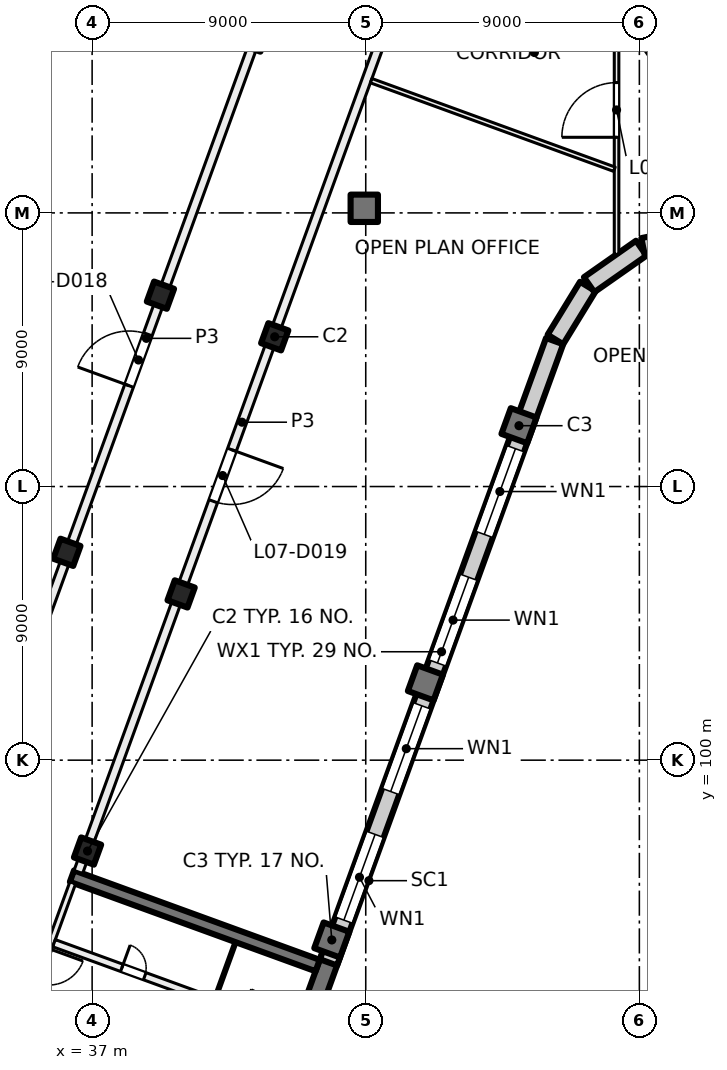
"""IFC4 building model, lengths in metres.
Left out: names, types, materials, properties, quantities, classifications, styles, units other than length and angle.
Written with IfcOpenShell. Run it as: python <this file> out.ifc"""

import sys

from ifc_helpers import new_model, si_unit, direction, frame, frame_2d, origin, origin_2d, place, context, subcontext, project, spatial, rectangle, hollow_rectangle, extrude, element, fill, save


model = new_model("IFC4")
c1 = context("Model", 3, precision=1e-05, world=origin(), true_north=direction((0.0, 1.0)))
c2 = subcontext(c1, "Body", "Model", "MODEL_VIEW")
j1 = project(units=[si_unit("LENGTHUNIT", "METRE"), si_unit("PLANEANGLEUNIT", "RADIAN")], contexts=[c1])
p1 = place(None, origin())
s1 = spatial("IfcSite", under=j1, at=p1, CompositionType="ELEMENT")
p2 = place(p1, origin())
s2 = spatial("IfcBuilding", under=s1, at=p2, CompositionType="ELEMENT")
p3 = place(p2, frame((0.0, 0.0, 35.5)))
s3 = spatial("IfcBuildingStorey", under=s2, at=p3, CompositionType="ELEMENT", Elevation=35.5)
p4 = place(p3, frame((56.036, 123.43, 0.0), z_axis=(0.0, 0.0, 1.0), x_axis=(0.573576436351, -0.819152044289, 0.0)))
e1 = element("IfcColumn", 1, at=p4, inside=s3, PredefinedType="COLUMN", context=c2, shape_type="SweptSolid", body=[
    extrude(hollow_rectangle(XDim=1.4, YDim=1.4, WallThickness=0.04, at=origin_2d()), origin(), (0.0, 0.0, 1.0), 4.0),
])
p5 = place(p3, frame((45.952, 118.152, 0.0), z_axis=(0.0, 0.0, 1.0), x_axis=(1.0, 0.0, 0.0)))
e2 = element("IfcColumn", 2, at=p5, inside=s3, PredefinedType="COLUMN", context=c2, shape_type="SweptSolid", body=[
    extrude(rectangle(XDim=0.9, YDim=0.9, at=origin_2d()), origin(), (0.0, 0.0, 1.0), 4.0),
])
for number, where, z_axis, x_axis in (
    (3, (43.006, 113.925, 0.0), (0.0, 0.0, 1.0), (-0.342, -0.94, 0.0)),
    (4, (39.927, 105.468, 0.0), (0.0, 0.0, 1.0), (-0.342, -0.94, 0.0)),
    (5, (36.849, 97.011, 0.0), (0.0, 0.0, 1.0), (-0.342, -0.94, 0.0)),
    (6, (39.247, 115.293, 0.0), (0.0, 0.0, 1.0), (-0.342, -0.94, 0.0)),
    (7, (36.169, 106.836, 0.0), (0.0, 0.0, 1.0), (-0.342, -0.94, 0.0)),
):
    element("IfcColumn", number, at=place(p3, frame(where, z_axis=z_axis, x_axis=x_axis)), inside=s3, PredefinedType="COLUMN", context=c2, shape_type="SweptSolid", body=[
        extrude(rectangle(XDim=0.7, YDim=0.7, at=origin_2d()), origin(), (0.0, 0.0, 1.0), 4.0),
    ])
for number, where, z_axis, x_axis in (
    (8, (51.04, 111.001, 0.0), (0.0, 0.0, 1.0), (-0.342, -0.94, 0.0)),
    (9, (47.962, 102.544, 0.0), (0.0, 0.0, 1.0), (-0.342, -0.94, 0.0)),
    (10, (44.884, 94.087, 0.0), (0.0, 0.0, 1.0), (-0.342, -0.94, 0.0)),
):
    element("IfcColumn", number, at=place(p3, frame(where, z_axis=z_axis, x_axis=x_axis)), inside=s3, PredefinedType="COLUMN", context=c2, shape_type="SweptSolid", body=[
        extrude(rectangle(XDim=0.9, YDim=0.9, at=origin_2d()), origin(), (0.0, 0.0, 1.0), 4.0),
    ])
p6 = place(p3, frame((41.827, 85.249, 0.0), z_axis=(0.0, 0.0, 1.0), x_axis=(0.342016162452, 0.939694069696, 0.0)))
e11 = element("IfcWall", 11, at=p6, inside=s3, PredefinedType="SHEAR", context=c2, shape_type="SweptSolid", body=[
    extrude(rectangle(XDim=8.9, YDim=0.6, at=frame_2d((4.45, 0.0))), origin(), (0.0, 0.0, 1.0), 4.0),
])
p7 = place(p3, frame((44.418, 93.245, 0.0), z_axis=(0.0, 0.0, 1.0), x_axis=(-0.93969060187, 0.342025690201, 0.0)))
e12 = element("IfcWall", 12, at=p7, inside=s3, PredefinedType="SHEAR", context=c2, shape_type="SweptSolid", body=[
    extrude(rectangle(XDim=8.6, YDim=0.4, at=frame_2d((4.3, 0.0))), origin(), (0.0, 0.0, 1.0), 4.0),
])
p8 = place(p3, frame((52.212, 113.783, 0.0), z_axis=(0.0, 0.0, 1.0), x_axis=(-0.34202521188, -0.939690775968, 0.0)))
e13 = element("IfcWall", 13, at=p8, inside=s3, PredefinedType="SOLIDWALL", context=c2, shape_type="SweptSolid", body=[
    extrude(rectangle(XDim=21.745, YDim=0.6, at=frame_2d((10.873, 0.0))), origin(), (0.0, 0.0, 1.0), 3.625),
])
p9 = place(p8, frame((3.765, 0.0, 0.9)))
e14 = element("IfcOpeningElement", 14, at=p9, cuts=e13, PredefinedType="OPENING", context=c2, shape_type="SweptSolid", body=[
    extrude(rectangle(XDim=3.0, YDim=2.4, at=frame_2d((1.5, 1.2))), frame((0.0, 0.31, 0.0), z_axis=(0.0, -1.0, 0.0), x_axis=(1.0, 0.0, 0.0)), (0.0, 0.0, 1.0), 0.62),
])
p10 = place(p8, frame((8.265, 0.0, 0.9)))
e15 = element("IfcOpeningElement", 15, at=p10, cuts=e13, PredefinedType="OPENING", context=c2, shape_type="SweptSolid", body=[
    extrude(rectangle(XDim=3.0, YDim=2.4, at=frame_2d((1.5, 1.2))), frame((0.0, 0.31, 0.0), z_axis=(0.0, -1.0, 0.0), x_axis=(1.0, 0.0, 0.0)), (0.0, 0.0, 1.0), 0.62),
])
p11 = place(p8, frame((12.765, 0.0, 0.9)))
e16 = element("IfcOpeningElement", 16, at=p11, cuts=e13, PredefinedType="OPENING", context=c2, shape_type="SweptSolid", body=[
    extrude(rectangle(XDim=3.0, YDim=2.4, at=frame_2d((1.5, 1.2))), frame((0.0, 0.31, 0.0), z_axis=(0.0, -1.0, 0.0), x_axis=(1.0, 0.0, 0.0)), (0.0, 0.0, 1.0), 0.62),
])
p12 = place(p8, frame((17.265, 0.0, 0.9)))
e17 = element("IfcOpeningElement", 17, at=p12, cuts=e13, PredefinedType="OPENING", context=c2, shape_type="SweptSolid", body=[
    extrude(rectangle(XDim=3.0, YDim=2.4, at=frame_2d((1.5, 1.2))), frame((0.0, 0.31, 0.0), z_axis=(0.0, -1.0, 0.0), x_axis=(1.0, 0.0, 0.0)), (0.0, 0.0, 1.0), 0.62),
])
p13 = place(p3, frame((53.305, 115.578, 0.0), z_axis=(0.0, 0.0, 1.0), x_axis=(-0.522402266438, -0.852699168535, 0.0)))
e18 = element("IfcWall", 18, at=p13, inside=s3, PredefinedType="SOLIDWALL", context=c2, shape_type="SweptSolid", body=[
    extrude(rectangle(XDim=2.042, YDim=0.6, at=frame_2d((1.021, 0.0))), origin(), (0.0, 0.0, 1.0), 3.625),
])
for number, where, z_axis, x_axis in (
    (19, (55.062, 116.839, 0.0), (0.0, 0.0, 1.0), (-0.819, -0.574, 0.0)),
    (20, (57.175, 117.294, 0.0), (0.0, 0.0, 1.0), (-0.98, -0.199, 0.0)),
):
    element("IfcWall", number, at=place(p3, frame(where, z_axis=z_axis, x_axis=x_axis)), inside=s3, PredefinedType="SOLIDWALL", context=c2, shape_type="SweptSolid", body=[
        extrude(rectangle(XDim=2.092, YDim=0.6, at=frame_2d((1.046, 0.0))), origin(), (0.0, 0.0, 1.0), 3.625),
    ])
p14 = place(p3, frame((24.666, 100.669, 0.0), z_axis=(0.0, 0.0, 1.0), x_axis=(0.34201964167, 0.939692803373, 0.0)))
e21 = element("IfcWall", 21, at=p14, inside=s3, PredefinedType="SOLIDWALL", context=c2, shape_type="SweptSolid", body=[
    extrude(rectangle(XDim=32.884, YDim=0.6, at=frame_2d((16.442, 0.0))), origin(), (0.0, 0.0, 1.0), 3.625),
])
p15 = place(p14, frame((1.48, 0.0, 0.9)))
e22 = element("IfcOpeningElement", 22, at=p15, cuts=e21, PredefinedType="OPENING", context=c2, shape_type="SweptSolid", body=[
    extrude(rectangle(XDim=3.0, YDim=2.4, at=frame_2d((1.5, 1.2))), frame((0.0, 0.31, 0.0), z_axis=(0.0, -1.0, 0.0), x_axis=(1.0, 0.0, 0.0)), (0.0, 0.0, 1.0), 0.62),
])
p16 = place(p14, frame((5.98, 0.0, 0.9)))
e23 = element("IfcOpeningElement", 23, at=p16, cuts=e21, PredefinedType="OPENING", context=c2, shape_type="SweptSolid", body=[
    extrude(rectangle(XDim=3.0, YDim=2.4, at=frame_2d((1.5, 1.2))), frame((0.0, 0.31, 0.0), z_axis=(0.0, -1.0, 0.0), x_axis=(1.0, 0.0, 0.0)), (0.0, 0.0, 1.0), 0.62),
])
p17 = place(p14, frame((10.48, 0.0, 0.9)))
e24 = element("IfcOpeningElement", 24, at=p17, cuts=e21, PredefinedType="OPENING", context=c2, shape_type="SweptSolid", body=[
    extrude(rectangle(XDim=3.0, YDim=2.4, at=frame_2d((1.5, 1.2))), frame((0.0, 0.31, 0.0), z_axis=(0.0, -1.0, 0.0), x_axis=(1.0, 0.0, 0.0)), (0.0, 0.0, 1.0), 0.62),
])
p18 = place(p14, frame((14.98, 0.0, 0.9)))
e25 = element("IfcOpeningElement", 25, at=p18, cuts=e21, PredefinedType="OPENING", context=c2, shape_type="SweptSolid", body=[
    extrude(rectangle(XDim=3.0, YDim=2.4, at=frame_2d((1.5, 1.2))), frame((0.0, 0.31, 0.0), z_axis=(0.0, -1.0, 0.0), x_axis=(1.0, 0.0, 0.0)), (0.0, 0.0, 1.0), 0.62),
])
p19 = place(p14, frame((19.48, 0.0, 0.9)))
e26 = element("IfcOpeningElement", 26, at=p19, cuts=e21, PredefinedType="OPENING", context=c2, shape_type="SweptSolid", body=[
    extrude(rectangle(XDim=3.0, YDim=2.4, at=frame_2d((1.5, 1.2))), frame((0.0, 0.31, 0.0), z_axis=(0.0, -1.0, 0.0), x_axis=(1.0, 0.0, 0.0)), (0.0, 0.0, 1.0), 0.62),
])
p20 = place(p14, frame((23.98, 0.0, 0.9)))
e27 = element("IfcOpeningElement", 27, at=p20, cuts=e21, PredefinedType="OPENING", context=c2, shape_type="SweptSolid", body=[
    extrude(rectangle(XDim=3.0, YDim=2.4, at=frame_2d((1.5, 1.2))), frame((0.0, 0.31, 0.0), z_axis=(0.0, -1.0, 0.0), x_axis=(1.0, 0.0, 0.0)), (0.0, 0.0, 1.0), 0.62),
])
p21 = place(p14, frame((28.48, 0.0, 0.9)))
e28 = element("IfcOpeningElement", 28, at=p21, cuts=e21, PredefinedType="OPENING", context=c2, shape_type="SweptSolid", body=[
    extrude(rectangle(XDim=3.0, YDim=2.4, at=frame_2d((1.5, 1.2))), frame((0.0, 0.31, 0.0), z_axis=(0.0, -1.0, 0.0), x_axis=(1.0, 0.0, 0.0)), (0.0, 0.0, 1.0), 0.62),
])
p22 = place(p3, frame((36.362, 95.964, 0.0), z_axis=(0.0, 0.0, 1.0), x_axis=(-0.341995824804, -0.939701471648, 0.0)))
e29 = element("IfcWall", 29, at=p22, inside=s3, PredefinedType="PARTITIONING", context=c2, shape_type="SweptSolid", body=[
    extrude(rectangle(XDim=3.8, YDim=0.2, at=frame_2d((1.9, 0.0))), origin(), (0.0, 0.0, 1.0), 3.625),
])
p23 = place(p22, frame((2.3, 0.0, 0.0)))
e30 = element("IfcOpeningElement", 30, at=p23, cuts=e29, PredefinedType="OPENING", context=c2, shape_type="SweptSolid", body=[
    extrude(rectangle(XDim=1.2, YDim=2.1, at=frame_2d((0.6, 1.05))), frame((0.0, 0.11, 0.0), z_axis=(0.0, -1.0, 0.0), x_axis=(1.0, 0.0, 0.0)), (0.0, 0.0, 1.0), 0.22),
])
p24 = place(p3, frame((35.19, 92.453, 0.0), z_axis=(0.0, 0.0, 1.0), x_axis=(0.939691552312, -0.342023078919, 0.0)))
e31 = element("IfcWall", 31, at=p24, inside=s3, PredefinedType="PARTITIONING", context=c2, shape_type="SweptSolid", body=[
    extrude(rectangle(XDim=8.4, YDim=0.2, at=frame_2d((4.2, 0.0))), origin(), (0.0, 0.0, 1.0), 3.625),
])
p25 = place(p24, frame((5.25, 0.0, 0.0)))
e32 = element("IfcOpeningElement", 32, at=p25, cuts=e31, PredefinedType="OPENING", context=c2, shape_type="SweptSolid", body=[
    extrude(rectangle(XDim=1.5, YDim=2.1, at=frame_2d((0.75, 1.05))), frame((0.0, 0.11, 0.0), z_axis=(0.0, -1.0, 0.0), x_axis=(1.0, 0.0, 0.0)), (0.0, 0.0, 1.0), 0.22),
])
p26 = place(p3, frame((35.746, 93.98, 0.0), z_axis=(0.0, 0.0, 1.0), x_axis=(0.939691552312, -0.342023078919, 0.0)))
e33 = element("IfcWall", 33, at=p26, inside=s3, PredefinedType="PARTITIONING", context=c2, shape_type="SweptSolid", body=[
    extrude(rectangle(XDim=8.4, YDim=0.25, at=frame_2d((4.2, 0.0))), origin(), (0.0, 0.0, 1.0), 3.625),
])
p27 = place(p26, frame((2.375, 0.0, 0.0)))
e34 = element("IfcOpeningElement", 34, at=p27, cuts=e33, PredefinedType="OPENING", context=c2, shape_type="SweptSolid", body=[
    extrude(rectangle(XDim=0.8, YDim=2.1, at=frame_2d((0.4, 1.05))), frame((0.0, 0.135, 0.0), z_axis=(0.0, -1.0, 0.0), x_axis=(1.0, 0.0, 0.0)), (0.0, 0.0, 1.0), 0.27),
])
p28 = place(p26, frame((6.625, 0.0, 0.0)))
e35 = element("IfcOpeningElement", 35, at=p28, cuts=e33, PredefinedType="OPENING", context=c2, shape_type="SweptSolid", body=[
    extrude(rectangle(XDim=0.8, YDim=2.1, at=frame_2d((0.4, 1.05))), frame((0.0, 0.135, 0.0), z_axis=(0.0, -1.0, 0.0), x_axis=(1.0, 0.0, 0.0)), (0.0, 0.0, 1.0), 0.27),
])
p29 = place(p3, frame((41.718, 94.015, 0.0), z_axis=(0.0, 0.0, 1.0), x_axis=(-0.342064742067, -0.939676386973, 0.0)))
e36 = element("IfcWall", 36, at=p29, inside=s3, PredefinedType="PARTITIONING", context=c2, shape_type="SweptSolid", body=[
    extrude(rectangle(XDim=1.95, YDim=0.1, at=frame_2d((0.975, 0.0))), origin(), (0.0, 0.0, 1.0), 3.625),
])
p30 = place(p3, frame((32.881, 97.657, 0.0), z_axis=(0.0, 0.0, 1.0), x_axis=(0.342017360004, 0.939693633828, 0.0)))
e37 = element("IfcWall", 37, at=p30, inside=s3, PredefinedType="PARTITIONING", context=c2, shape_type="SweptSolid", body=[
    extrude(rectangle(XDim=34.516, YDim=0.3, at=frame_2d((17.258, 0.0))), origin(), (0.0, 0.0, 1.0), 3.625),
])
p31 = place(p30, frame((2.025, 0.0, 0.0)))
e38 = element("IfcOpeningElement", 38, at=p31, cuts=e37, PredefinedType="OPENING", context=c2, shape_type="SweptSolid", body=[
    extrude(rectangle(XDim=1.2, YDim=2.1, at=frame_2d((0.6, 1.05))), frame((0.0, 0.16, 0.0), z_axis=(0.0, -1.0, 0.0), x_axis=(1.0, 0.0, 0.0)), (0.0, 0.0, 1.0), 0.32),
])
p32 = place(p30, frame((15.6, 0.0, 0.0)))
e39 = element("IfcOpeningElement", 39, at=p32, cuts=e37, PredefinedType="OPENING", context=c2, shape_type="SweptSolid", body=[
    extrude(rectangle(XDim=1.8, YDim=2.1, at=frame_2d((0.9, 1.05))), frame((0.0, 0.16, 0.0), z_axis=(0.0, -1.0, 0.0), x_axis=(1.0, 0.0, 0.0)), (0.0, 0.0, 1.0), 0.32),
])
p33 = place(p3, frame((47.314, 125.909, 0.0), z_axis=(0.0, 0.0, 1.0), x_axis=(-0.342010770371, -0.939696032209, 0.0)))
e40 = element("IfcWall", 40, at=p33, inside=s3, PredefinedType="PARTITIONING", context=c2, shape_type="SweptSolid", body=[
    extrude(rectangle(XDim=31.485, YDim=0.3, at=frame_2d((15.742, 0.0))), origin(), (0.0, 0.0, 1.0), 3.625),
])
p34 = place(p33, frame((16.709, 0.0, 0.0)))
e41 = element("IfcOpeningElement", 41, at=p34, cuts=e40, PredefinedType="OPENING", context=c2, shape_type="SweptSolid", body=[
    extrude(rectangle(XDim=1.8, YDim=2.1, at=frame_2d((0.9, 1.05))), frame((0.0, 0.16, 0.0), z_axis=(0.0, -1.0, 0.0), x_axis=(1.0, 0.0, 0.0)), (0.0, 0.0, 1.0), 0.32),
])
p35 = place(p3, frame((54.25, 116.637, 0.0), z_axis=(0.0, 0.0, 1.0), x_axis=(0.0, 1.0, 0.0)))
e42 = element("IfcWall", 42, at=p35, inside=s3, PredefinedType="PARTITIONING", context=c2, shape_type="SweptSolid", body=[
    extrude(rectangle(XDim=6.709, YDim=0.15, at=frame_2d((3.354, 0.0))), origin(), (0.0, 0.0, 1.0), 3.625),
])
p36 = place(p35, frame((3.85, 0.0, 0.0)))
e43 = element("IfcOpeningElement", 43, at=p36, cuts=e42, PredefinedType="OPENING", context=c2, shape_type="SweptSolid", body=[
    extrude(rectangle(XDim=1.8, YDim=2.1, at=frame_2d((0.9, 1.05))), frame((0.0, 0.085, 0.0), z_axis=(0.0, -1.0, 0.0), x_axis=(1.0, 0.0, 0.0)), (0.0, 0.0, 1.0), 0.17),
])
p37 = place(p3, frame((54.18, 119.436, 0.0), z_axis=(0.0, 0.0, 1.0), x_axis=(-0.939669476286, 0.342083725624, 0.0)))
e44 = element("IfcWall", 44, at=p37, inside=s3, PredefinedType="PARTITIONING", context=c2, shape_type="SweptSolid", body=[
    extrude(rectangle(XDim=8.516, YDim=0.15, at=frame_2d((4.258, 0.0))), origin(), (0.0, 0.0, 1.0), 3.625),
])
p38 = place(p9, origin())
e45 = element("IfcWindow", 45, at=p38, inside=s3, PartitioningType="SINGLE_PANEL", PredefinedType="WINDOW", context=c2, shape_type="SweptSolid", body=[
    extrude(rectangle(XDim=3.0, YDim=2.4, at=frame_2d((1.5, 1.2))), frame((0.0, 0.03, 0.0), z_axis=(0.0, -1.0, 0.0), x_axis=(1.0, 0.0, 0.0)), (0.0, 0.0, 1.0), 0.06),
])
fill(e14, e45)
p39 = place(p10, origin())
e46 = element("IfcWindow", 46, at=p39, inside=s3, PartitioningType="SINGLE_PANEL", PredefinedType="WINDOW", context=c2, shape_type="SweptSolid", body=[
    extrude(rectangle(XDim=3.0, YDim=2.4, at=frame_2d((1.5, 1.2))), frame((0.0, 0.03, 0.0), z_axis=(0.0, -1.0, 0.0), x_axis=(1.0, 0.0, 0.0)), (0.0, 0.0, 1.0), 0.06),
])
fill(e15, e46)
p40 = place(p11, origin())
e47 = element("IfcWindow", 47, at=p40, inside=s3, PartitioningType="SINGLE_PANEL", PredefinedType="WINDOW", context=c2, shape_type="SweptSolid", body=[
    extrude(rectangle(XDim=3.0, YDim=2.4, at=frame_2d((1.5, 1.2))), frame((0.0, 0.03, 0.0), z_axis=(0.0, -1.0, 0.0), x_axis=(1.0, 0.0, 0.0)), (0.0, 0.0, 1.0), 0.06),
])
fill(e16, e47)
p41 = place(p12, origin())
e48 = element("IfcWindow", 48, at=p41, inside=s3, PartitioningType="SINGLE_PANEL", PredefinedType="WINDOW", context=c2, shape_type="SweptSolid", body=[
    extrude(rectangle(XDim=3.0, YDim=2.4, at=frame_2d((1.5, 1.2))), frame((0.0, 0.03, 0.0), z_axis=(0.0, -1.0, 0.0), x_axis=(1.0, 0.0, 0.0)), (0.0, 0.0, 1.0), 0.06),
])
fill(e17, e48)
p42 = place(p27, origin())
e49 = element("IfcDoor", 49, at=p42, inside=s3, OperationType="SINGLE_SWING_RIGHT", PredefinedType="DOOR", context=c2, shape_type="SweptSolid", body=[
    extrude(rectangle(XDim=0.8, YDim=2.1, at=frame_2d((0.4, 1.05))), frame((0.0, 0.025, 0.0), z_axis=(0.0, -1.0, 0.0), x_axis=(1.0, 0.0, 0.0)), (0.0, 0.0, 1.0), 0.05),
])
fill(e34, e49)
p43 = place(p36, origin())
e50 = element("IfcDoor", 50, at=p43, inside=s3, OperationType="DOUBLE_DOOR_SINGLE_SWING", PredefinedType="DOOR", context=c2, shape_type="SweptSolid", body=[
    extrude(rectangle(XDim=1.8, YDim=2.1, at=frame_2d((0.9, 1.05))), frame((0.0, 0.025, 0.0), z_axis=(0.0, -1.0, 0.0), x_axis=(1.0, 0.0, 0.0)), (0.0, 0.0, 1.0), 0.05),
])
fill(e43, e50)
p44 = place(p32, origin())
e51 = element("IfcDoor", 51, at=p44, inside=s3, OperationType="DOUBLE_DOOR_SINGLE_SWING", PredefinedType="DOOR", context=c2, shape_type="SweptSolid", body=[
    extrude(rectangle(XDim=1.8, YDim=2.1, at=frame_2d((0.9, 1.05))), frame((0.0, 0.025, 0.0), z_axis=(0.0, -1.0, 0.0), x_axis=(1.0, 0.0, 0.0)), (0.0, 0.0, 1.0), 0.05),
])
fill(e39, e51)
p45 = place(p34, origin())
e52 = element("IfcDoor", 52, at=p45, inside=s3, OperationType="DOUBLE_DOOR_SINGLE_SWING", PredefinedType="DOOR", context=c2, shape_type="SweptSolid", body=[
    extrude(rectangle(XDim=1.8, YDim=2.1, at=frame_2d((0.9, 1.05))), frame((0.0, 0.025, 0.0), z_axis=(0.0, -1.0, 0.0), x_axis=(1.0, 0.0, 0.0)), (0.0, 0.0, 1.0), 0.05),
])
fill(e41, e52)
save(model, sys.argv[1])
